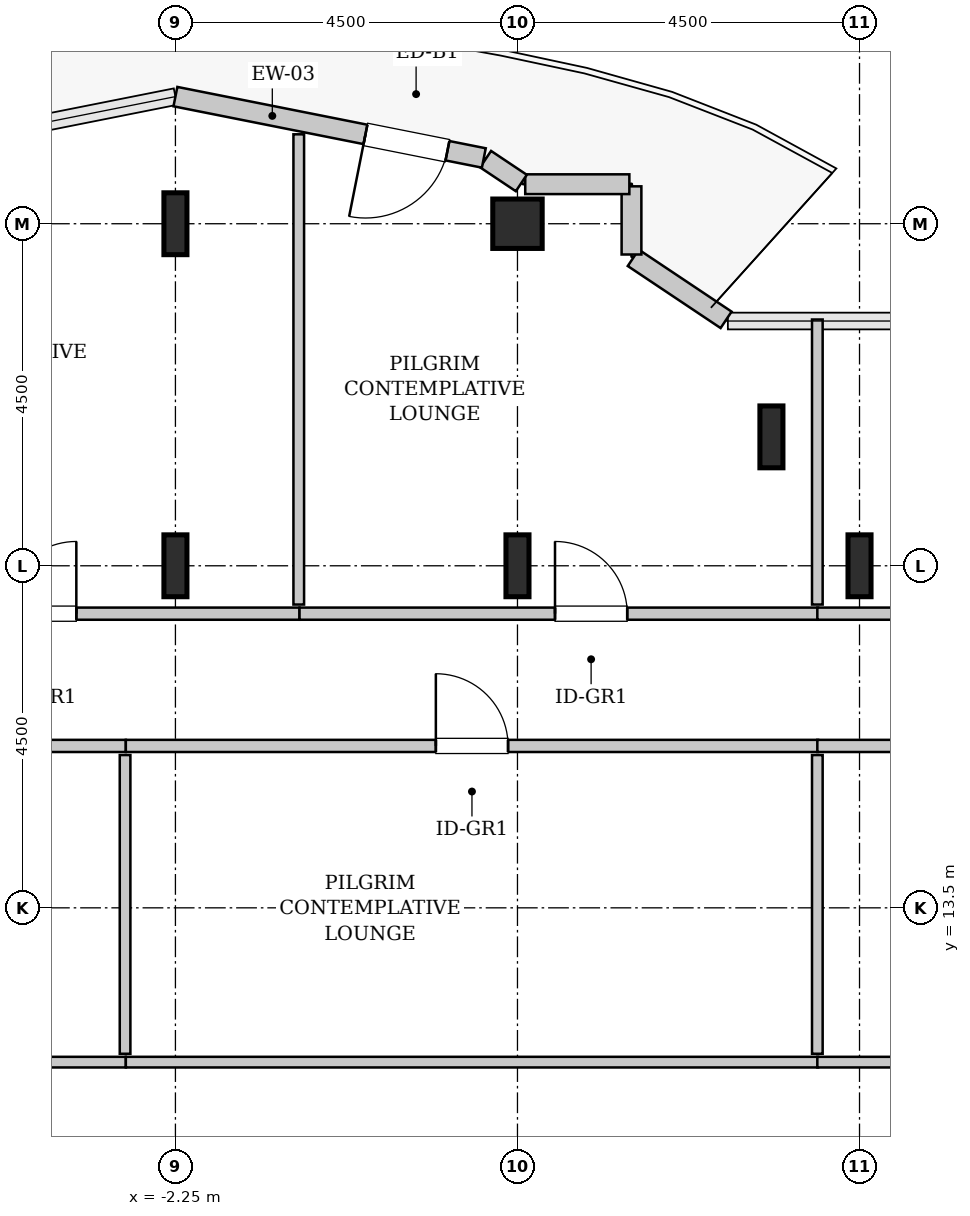
"""IFC4 building model, lengths in metres.
Left out: names, types, materials, properties, quantities, classifications, styles, units other than length and angle.
Written with IfcOpenShell. Run it as: python <this file> out.ifc"""

import sys

from ifc_helpers import new_model, si_unit, direction, frame, frame_2d, origin, origin_2d, place, context, subcontext, project, spatial, rectangle, hollow_rectangle, i_section, extrude, source, transform, mapped, element, fill, save


model = new_model("IFC4")
c1 = context("Model", 3, precision=1e-05, world=origin(), true_north=direction((0.0, 1.0)))
c2 = subcontext(c1, "Body", "Model", "MODEL_VIEW")
j1 = project(units=[si_unit("LENGTHUNIT", "METRE"), si_unit("PLANEANGLEUNIT", "RADIAN")], contexts=[c1])
p1 = place(None, origin())
s1 = spatial("IfcSite", under=j1, at=p1, CompositionType="ELEMENT")
p2 = place(p1, origin())
s2 = spatial("IfcBuilding", under=s1, at=p2, CompositionType="ELEMENT")
p3 = place(p2, frame((0.0, 0.0, 233.2)))
s3 = spatial("IfcBuildingStorey", under=s2, at=p3, CompositionType="ELEMENT", Elevation=233.2)
m1 = source(origin(), c2, "Body", "SweptSolid", [
    extrude(i_section(OverallWidth=0.303, OverallDepth=0.814, WebThickness=0.021, FlangeThickness=0.04, FilletRadius=0.03, at=origin_2d()), origin(), (0.0, 0.0, 1.0), 3.8),
])
for number, where, z_axis, x_axis in (
    (1, (-2.25, 18.0, 0.0), (0.0, 0.0, 1.0), (1.0, 0.0, 0.0)),
    (2, (-2.25, 22.5, 0.0), (0.0, 0.0, 1.0), (1.0, 0.0, 0.0)),
    (3, (2.25, 18.0, 0.0), (0.0, 0.0, 1.0), (1.0, 0.0, 0.0)),
):
    element("IfcColumn", number, at=place(p3, frame(where, z_axis=z_axis, x_axis=x_axis)), inside=s3, PredefinedType="COLUMN", context=c2, shape_type="MappedRepresentation", body=[
        mapped(m1, transform((0.0, 0.0, 0.0), x_axis=(1.0, 0.0, 0.0), y_axis=(0.0, 1.0, 0.0), z_axis=(0.0, 0.0, 1.0), scale=1.0)),
    ])
m2 = source(origin(), c2, "Body", "SweptSolid", [
    extrude(hollow_rectangle(XDim=0.65, YDim=0.65, WallThickness=0.032, InnerFilletRadius=0.032, OuterFilletRadius=0.064, at=origin_2d()), origin(), (0.0, 0.0, 1.0), 3.8),
])
p4 = place(p3, frame((2.25, 22.5, 0.0), z_axis=(0.0, 0.0, 1.0), x_axis=(1.0, 0.0, 0.0)))
e4 = element("IfcColumn", 4, at=p4, inside=s3, PredefinedType="COLUMN", context=c2, shape_type="MappedRepresentation", body=[
    mapped(m2, transform((0.0, 0.0, 0.0), x_axis=(1.0, 0.0, 0.0), y_axis=(0.0, 1.0, 0.0), z_axis=(0.0, 0.0, 1.0), scale=1.0)),
])
for number, where, z_axis, x_axis in (
    (5, (5.591, 19.696, 0.0), (0.0, 0.0, 1.0), (1.0, 0.0, 0.0)),
    (6, (6.75, 18.0, 0.0), (0.0, 0.0, 1.0), (1.0, 0.0, 0.0)),
):
    element("IfcColumn", number, at=place(p3, frame(where, z_axis=z_axis, x_axis=x_axis)), inside=s3, PredefinedType="COLUMN", context=c2, shape_type="MappedRepresentation", body=[
        mapped(m1, transform((0.0, 0.0, 0.0), x_axis=(1.0, 0.0, 0.0), y_axis=(0.0, 1.0, 0.0), z_axis=(0.0, 0.0, 1.0), scale=1.0)),
    ])
m3 = source(origin(), c2, "Body", "SweptSolid", [
    extrude(rectangle(XDim=1.469, YDim=0.26, at=frame_2d((0.734, 0.0))), origin(), (0.0, 0.0, 1.0), 3.55),
])
p5 = place(p3, frame((4.995, 21.236, 0.0), z_axis=(0.0, 0.0, 1.0), x_axis=(-0.831461760506, 0.555581983884, 0.0)))
e7 = element("IfcWall", 7, at=p5, inside=s3, PredefinedType="SOLIDWALL", context=c2, shape_type="MappedRepresentation", body=[
    mapped(m3, transform((0.0, 0.0, 0.0), x_axis=(1.0, 0.0, 0.0), y_axis=(0.0, 1.0, 0.0), z_axis=(0.0, 0.0, 1.0), scale=1.0)),
])
m4 = source(origin(), c2, "Body", "SweptSolid", [
    extrude(rectangle(XDim=0.897, YDim=0.26, at=frame_2d((0.448, 0.0))), origin(), (0.0, 0.0, 1.0), 3.55),
])
p6 = place(p3, frame((3.75, 22.095, 0.0), z_axis=(0.0, 0.0, 1.0), x_axis=(0.0, 1.0, 0.0)))
e8 = element("IfcWall", 8, at=p6, inside=s3, PredefinedType="SOLIDWALL", context=c2, shape_type="MappedRepresentation", body=[
    mapped(m4, transform((0.0, 0.0, 0.0), x_axis=(1.0, 0.0, 0.0), y_axis=(0.0, 1.0, 0.0), z_axis=(0.0, 0.0, 1.0), scale=1.0)),
])
m5 = source(origin(), c2, "Body", "SweptSolid", [
    extrude(rectangle(XDim=1.37, YDim=0.26, at=frame_2d((0.685, 0.0))), origin(), (0.0, 0.0, 1.0), 3.55),
])
p7 = place(p3, frame((3.722, 23.02, 0.0), z_axis=(0.0, 0.0, 1.0), x_axis=(-1.0, 0.0, 0.0)))
e9 = element("IfcWall", 9, at=p7, inside=s3, PredefinedType="SOLIDWALL", context=c2, shape_type="MappedRepresentation", body=[
    mapped(m5, transform((0.0, 0.0, 0.0), x_axis=(1.0, 0.0, 0.0), y_axis=(0.0, 1.0, 0.0), z_axis=(0.0, 0.0, 1.0), scale=1.0)),
])
m6 = source(origin(), c2, "Body", "SweptSolid", [
    extrude(rectangle(XDim=0.565, YDim=0.26, at=frame_2d((0.283, 0.0))), origin(), (0.0, 0.0, 1.0), 3.55),
])
p8 = place(p3, frame((2.301, 23.036, 0.0), z_axis=(0.0, 0.0, 1.0), x_axis=(-0.831651492666, 0.555297933317, 0.0)))
e10 = element("IfcWall", 10, at=p8, inside=s3, PredefinedType="SOLIDWALL", context=c2, shape_type="MappedRepresentation", body=[
    mapped(m6, transform((0.0, 0.0, 0.0), x_axis=(1.0, 0.0, 0.0), y_axis=(0.0, 1.0, 0.0), z_axis=(0.0, 0.0, 1.0), scale=1.0)),
])
m7 = source(origin(), c2, "Body", "SweptSolid", [
    extrude(rectangle(XDim=4.137, YDim=0.26, at=frame_2d((2.068, 0.0))), origin(), (0.0, 0.0, 1.0), 3.55),
])
p9 = place(p3, frame((1.807, 23.365, 0.0), z_axis=(0.0, 0.0, 1.0), x_axis=(-0.980782170794, 0.195105954428, 0.0)))
e11 = element("IfcWall", 11, at=p9, inside=s3, PredefinedType="SOLIDWALL", context=c2, shape_type="MappedRepresentation", body=[
    mapped(m7, transform((0.0, 0.0, 0.0), x_axis=(1.0, 0.0, 0.0), y_axis=(0.0, 1.0, 0.0), z_axis=(0.0, 0.0, 1.0), scale=1.0)),
])
p10 = place(p9, frame((0.488, 0.0, 0.0)))
e12 = element("IfcOpeningElement", 12, at=p10, cuts=e11, PredefinedType="OPENING", context=c2, shape_type="SweptSolid", body=[
    extrude(rectangle(XDim=1.1, YDim=2.2, at=frame_2d((0.55, 1.1))), frame((0.0, 0.14, 0.0), z_axis=(0.0, -1.0, 0.0), x_axis=(1.0, 0.0, 0.0)), (0.0, 0.0, 1.0), 0.28),
])
m8 = source(origin(), c2, "Body", "SweptSolid", [
    extrude(rectangle(XDim=9.107, YDim=0.16, at=frame_2d((4.554, 0.0))), origin(), (0.0, 0.0, 1.0), 3.535),
])
p11 = place(p3, frame((-12.01, 15.63, 0.0), z_axis=(0.0, 0.0, 1.0), x_axis=(1.0, 0.0, 0.0)))
e13 = element("IfcWall", 13, at=p11, inside=s3, PredefinedType="PARTITIONING", context=c2, shape_type="MappedRepresentation", body=[
    mapped(m8, transform((0.0, 0.0, 0.0), x_axis=(1.0, 0.0, 0.0), y_axis=(0.0, 1.0, 0.0), z_axis=(0.0, 0.0, 1.0), scale=1.0)),
])
p12 = place(p11, frame((4.079, 0.0, 0.0)))
e14 = element("IfcOpeningElement", 14, at=p12, cuts=e13, PredefinedType="OPENING", context=c2, shape_type="SweptSolid", body=[
    extrude(rectangle(XDim=0.95, YDim=2.1, at=frame_2d((0.475, 1.05))), frame((0.0, 0.09, 0.0), z_axis=(0.0, -1.0, 0.0), x_axis=(1.0, 0.0, 0.0)), (0.0, 0.0, 1.0), 0.18),
])
m9 = source(origin(), c2, "Body", "SweptSolid", [
    extrude(rectangle(XDim=9.107, YDim=0.14, at=frame_2d((4.554, 0.0))), origin(), (0.0, 0.0, 1.0), 3.535),
])
p13 = place(p3, frame((-12.01, 11.47, 0.0), z_axis=(0.0, 0.0, 1.0), x_axis=(1.0, 0.0, 0.0)))
e15 = element("IfcWall", 15, at=p13, inside=s3, PredefinedType="PARTITIONING", context=c2, shape_type="MappedRepresentation", body=[
    mapped(m9, transform((0.0, 0.0, 0.0), x_axis=(1.0, 0.0, 0.0), y_axis=(0.0, 1.0, 0.0), z_axis=(0.0, 0.0, 1.0), scale=1.0)),
])
m10 = source(origin(), c2, "Body", "SweptSolid", [
    extrude(rectangle(XDim=3.93, YDim=0.14, at=frame_2d((1.965, 0.0))), origin(), (0.0, 0.0, 1.0), 3.535),
])
p14 = place(p3, frame((-2.913, 11.58, 0.0), z_axis=(0.0, 0.0, 1.0), x_axis=(0.0, 1.0, 0.0)))
e16 = element("IfcWall", 16, at=p14, inside=s3, PredefinedType="PARTITIONING", context=c2, shape_type="MappedRepresentation", body=[
    mapped(m10, transform((0.0, 0.0, 0.0), x_axis=(1.0, 0.0, 0.0), y_axis=(0.0, 1.0, 0.0), z_axis=(0.0, 0.0, 1.0), scale=1.0)),
])
m11 = source(origin(), c2, "Body", "SweptSolid", [
    extrude(rectangle(XDim=9.108, YDim=0.16, at=frame_2d((4.554, 0.0))), origin(), (0.0, 0.0, 1.0), 3.535),
])
p15 = place(p3, frame((-2.903, 15.63, 0.0), z_axis=(0.0, 0.0, 1.0), x_axis=(1.0, 0.0, 0.0)))
e17 = element("IfcWall", 17, at=p15, inside=s3, PredefinedType="PARTITIONING", context=c2, shape_type="MappedRepresentation", body=[
    mapped(m11, transform((0.0, 0.0, 0.0), x_axis=(1.0, 0.0, 0.0), y_axis=(0.0, 1.0, 0.0), z_axis=(0.0, 0.0, 1.0), scale=1.0)),
])
p16 = place(p15, frame((4.079, 0.0, 0.0)))
e18 = element("IfcOpeningElement", 18, at=p16, cuts=e17, PredefinedType="OPENING", context=c2, shape_type="SweptSolid", body=[
    extrude(rectangle(XDim=0.95, YDim=2.1, at=frame_2d((0.475, 1.05))), frame((0.0, 0.09, 0.0), z_axis=(0.0, -1.0, 0.0), x_axis=(1.0, 0.0, 0.0)), (0.0, 0.0, 1.0), 0.18),
])
m12 = source(origin(), c2, "Body", "SweptSolid", [
    extrude(rectangle(XDim=9.108, YDim=0.14, at=frame_2d((4.554, 0.0))), origin(), (0.0, 0.0, 1.0), 3.535),
])
p17 = place(p3, frame((-2.903, 11.47, 0.0), z_axis=(0.0, 0.0, 1.0), x_axis=(1.0, 0.0, 0.0)))
e19 = element("IfcWall", 19, at=p17, inside=s3, PredefinedType="PARTITIONING", context=c2, shape_type="MappedRepresentation", body=[
    mapped(m12, transform((0.0, 0.0, 0.0), x_axis=(1.0, 0.0, 0.0), y_axis=(0.0, 1.0, 0.0), z_axis=(0.0, 0.0, 1.0), scale=1.0)),
])
p18 = place(p3, frame((6.195, 11.58, 0.0), z_axis=(0.0, 0.0, 1.0), x_axis=(0.0, 1.0, 0.0)))
e20 = element("IfcWall", 20, at=p18, inside=s3, PredefinedType="PARTITIONING", context=c2, shape_type="MappedRepresentation", body=[
    mapped(m10, transform((0.0, 0.0, 0.0), x_axis=(1.0, 0.0, 0.0), y_axis=(0.0, 1.0, 0.0), z_axis=(0.0, 0.0, 1.0), scale=1.0)),
])
m13 = source(origin(), c2, "Body", "SweptSolid", [
    extrude(rectangle(XDim=6.823, YDim=0.16, at=frame_2d((3.411, 0.0))), origin(), (0.0, 0.0, 1.0), 3.535),
])
p19 = place(p3, frame((-7.44, 17.37, 0.0), z_axis=(0.0, 0.0, 1.0), x_axis=(1.0, 0.0, 0.0)))
e21 = element("IfcWall", 21, at=p19, inside=s3, PredefinedType="PARTITIONING", context=c2, shape_type="MappedRepresentation", body=[
    mapped(m13, transform((0.0, 0.0, 0.0), x_axis=(1.0, 0.0, 0.0), y_axis=(0.0, 1.0, 0.0), z_axis=(0.0, 0.0, 1.0), scale=1.0)),
])
p20 = place(p19, frame((2.936, 0.0, 0.0)))
e22 = element("IfcOpeningElement", 22, at=p20, cuts=e21, PredefinedType="OPENING", context=c2, shape_type="SweptSolid", body=[
    extrude(rectangle(XDim=0.95, YDim=2.1, at=frame_2d((0.475, 1.05))), frame((0.0, 0.09, 0.0), z_axis=(0.0, -1.0, 0.0), x_axis=(1.0, 0.0, 0.0)), (0.0, 0.0, 1.0), 0.18),
])
m14 = source(origin(), c2, "Body", "SweptSolid", [
    extrude(rectangle(XDim=6.187, YDim=0.14, at=frame_2d((3.093, 0.0))), origin(), (0.0, 0.0, 1.0), 3.535),
])
p21 = place(p3, frame((-0.627, 17.49, 0.0), z_axis=(0.0, 0.0, 1.0), x_axis=(0.0, 1.0, 0.0)))
e23 = element("IfcWall", 23, at=p21, inside=s3, PredefinedType="PARTITIONING", context=c2, shape_type="MappedRepresentation", body=[
    mapped(m14, transform((0.0, 0.0, 0.0), x_axis=(1.0, 0.0, 0.0), y_axis=(0.0, 1.0, 0.0), z_axis=(0.0, 0.0, 1.0), scale=1.0)),
])
p22 = place(p3, frame((-0.617, 17.37, 0.0), z_axis=(0.0, 0.0, 1.0), x_axis=(1.0, 0.0, 0.0)))
e24 = element("IfcWall", 24, at=p22, inside=s3, PredefinedType="PARTITIONING", context=c2, shape_type="MappedRepresentation", body=[
    mapped(m13, transform((0.0, 0.0, 0.0), x_axis=(1.0, 0.0, 0.0), y_axis=(0.0, 1.0, 0.0), z_axis=(0.0, 0.0, 1.0), scale=1.0)),
])
p23 = place(p22, frame((3.361, 0.0, 0.0)))
e25 = element("IfcOpeningElement", 25, at=p23, cuts=e24, PredefinedType="OPENING", context=c2, shape_type="SweptSolid", body=[
    extrude(rectangle(XDim=0.95, YDim=2.1, at=frame_2d((0.475, 1.05))), frame((0.0, 0.09, 0.0), z_axis=(0.0, -1.0, 0.0), x_axis=(1.0, 0.0, 0.0)), (0.0, 0.0, 1.0), 0.18),
])
m15 = source(origin(), c2, "Body", "SweptSolid", [
    extrude(rectangle(XDim=3.75, YDim=0.14, at=frame_2d((1.875, 0.0))), origin(), (0.0, 0.0, 1.0), 3.535),
])
p24 = place(p3, frame((6.195, 17.49, 0.0), z_axis=(0.0, 0.0, 1.0), x_axis=(0.0, 1.0, 0.0)))
e26 = element("IfcWall", 26, at=p24, inside=s3, PredefinedType="PARTITIONING", context=c2, shape_type="MappedRepresentation", body=[
    mapped(m15, transform((0.0, 0.0, 0.0), x_axis=(1.0, 0.0, 0.0), y_axis=(0.0, 1.0, 0.0), z_axis=(0.0, 0.0, 1.0), scale=1.0)),
])
m16 = source(origin(), c2, "Body", "SweptSolid", [
    extrude(rectangle(XDim=7.425, YDim=0.16, at=frame_2d((3.712, 0.0))), origin(), (0.0, 0.0, 1.0), 3.535),
])
p25 = place(p3, frame((6.195, 17.37, 0.0), z_axis=(0.0, 0.0, 1.0), x_axis=(1.0, 0.0, 0.0)))
e27 = element("IfcWall", 27, at=p25, inside=s3, PredefinedType="PARTITIONING", context=c2, shape_type="MappedRepresentation", body=[
    mapped(m16, transform((0.0, 0.0, 0.0), x_axis=(1.0, 0.0, 0.0), y_axis=(0.0, 1.0, 0.0), z_axis=(0.0, 0.0, 1.0), scale=1.0)),
])
p26 = place(p25, frame((3.238, 0.0, 0.0)))
e28 = element("IfcOpeningElement", 28, at=p26, cuts=e27, PredefinedType="OPENING", context=c2, shape_type="SweptSolid", body=[
    extrude(rectangle(XDim=0.95, YDim=2.1, at=frame_2d((0.475, 1.05))), frame((0.0, 0.09, 0.0), z_axis=(0.0, -1.0, 0.0), x_axis=(1.0, 0.0, 0.0)), (0.0, 0.0, 1.0), 0.18),
])
m17 = source(origin(), c2, "Body", "SweptSolid", [
    extrude(rectangle(XDim=5.815, YDim=0.16, at=frame_2d((2.907, 0.0))), origin(), (0.0, 0.0, 1.0), 3.535),
])
p27 = place(p3, frame((6.195, 15.63, 0.0), z_axis=(0.0, 0.0, 1.0), x_axis=(1.0, 0.0, 0.0)))
e29 = element("IfcWall", 29, at=p27, inside=s3, PredefinedType="PARTITIONING", context=c2, shape_type="MappedRepresentation", body=[
    mapped(m17, transform((0.0, 0.0, 0.0), x_axis=(1.0, 0.0, 0.0), y_axis=(0.0, 1.0, 0.0), z_axis=(0.0, 0.0, 1.0), scale=1.0)),
])
p28 = place(p27, frame((2.433, 0.0, 0.0)))
e30 = element("IfcOpeningElement", 30, at=p28, cuts=e29, PredefinedType="OPENING", context=c2, shape_type="SweptSolid", body=[
    extrude(rectangle(XDim=0.95, YDim=2.1, at=frame_2d((0.475, 1.05))), frame((0.0, 0.09, 0.0), z_axis=(0.0, -1.0, 0.0), x_axis=(1.0, 0.0, 0.0)), (0.0, 0.0, 1.0), 0.18),
])
m18 = source(origin(), c2, "Body", "SweptSolid", [
    extrude(rectangle(XDim=5.815, YDim=0.14, at=frame_2d((2.907, 0.0))), origin(), (0.0, 0.0, 1.0), 3.535),
])
p29 = place(p3, frame((6.195, 11.47, 0.0), z_axis=(0.0, 0.0, 1.0), x_axis=(1.0, 0.0, 0.0)))
e31 = element("IfcWall", 31, at=p29, inside=s3, PredefinedType="PARTITIONING", context=c2, shape_type="MappedRepresentation", body=[
    mapped(m18, transform((0.0, 0.0, 0.0), x_axis=(1.0, 0.0, 0.0), y_axis=(0.0, 1.0, 0.0), z_axis=(0.0, 0.0, 1.0), scale=1.0)),
])
m19 = source(origin(), c2, "Body", "SweptSolid", [
    extrude(rectangle(XDim=1.1, YDim=2.2, at=frame_2d((0.55, 1.1))), frame((0.0, 0.025, 0.0), z_axis=(0.0, -1.0, 0.0), x_axis=(1.0, 0.0, 0.0)), (0.0, 0.0, 1.0), 0.05),
])
p30 = place(p10, origin())
e32 = element("IfcDoor", 32, at=p30, inside=s3, OperationType="SINGLE_SWING_RIGHT", PredefinedType="DOOR", context=c2, shape_type="MappedRepresentation", body=[
    mapped(m19, transform((0.0, 0.0, 0.0), x_axis=(1.0, 0.0, 0.0), y_axis=(0.0, 1.0, 0.0), z_axis=(0.0, 0.0, 1.0), scale=1.0)),
])
fill(e12, e32)
m20 = source(origin(), c2, "Body", "SweptSolid", [
    extrude(rectangle(XDim=0.95, YDim=2.1, at=frame_2d((0.475, 1.05))), frame((0.0, 0.025, 0.0), z_axis=(0.0, -1.0, 0.0), x_axis=(1.0, 0.0, 0.0)), (0.0, 0.0, 1.0), 0.05),
])
p31 = place(p16, origin())
e33 = element("IfcDoor", 33, at=p31, inside=s3, OperationType="SINGLE_SWING_LEFT", PredefinedType="DOOR", context=c2, shape_type="MappedRepresentation", body=[
    mapped(m20, transform((0.0, 0.0, 0.0), x_axis=(1.0, 0.0, 0.0), y_axis=(0.0, 1.0, 0.0), z_axis=(0.0, 0.0, 1.0), scale=1.0)),
])
fill(e18, e33)
p32 = place(p20, origin())
e34 = element("IfcDoor", 34, at=p32, inside=s3, OperationType="SINGLE_SWING_RIGHT", PredefinedType="DOOR", context=c2, shape_type="MappedRepresentation", body=[
    mapped(m20, transform((0.0, 0.0, 0.0), x_axis=(1.0, 0.0, 0.0), y_axis=(0.0, 1.0, 0.0), z_axis=(0.0, 0.0, 1.0), scale=1.0)),
])
fill(e22, e34)
p33 = place(p23, origin())
e35 = element("IfcDoor", 35, at=p33, inside=s3, OperationType="SINGLE_SWING_LEFT", PredefinedType="DOOR", context=c2, shape_type="MappedRepresentation", body=[
    mapped(m20, transform((0.0, 0.0, 0.0), x_axis=(1.0, 0.0, 0.0), y_axis=(0.0, 1.0, 0.0), z_axis=(0.0, 0.0, 1.0), scale=1.0)),
])
fill(e25, e35)
save(model, sys.argv[1])
